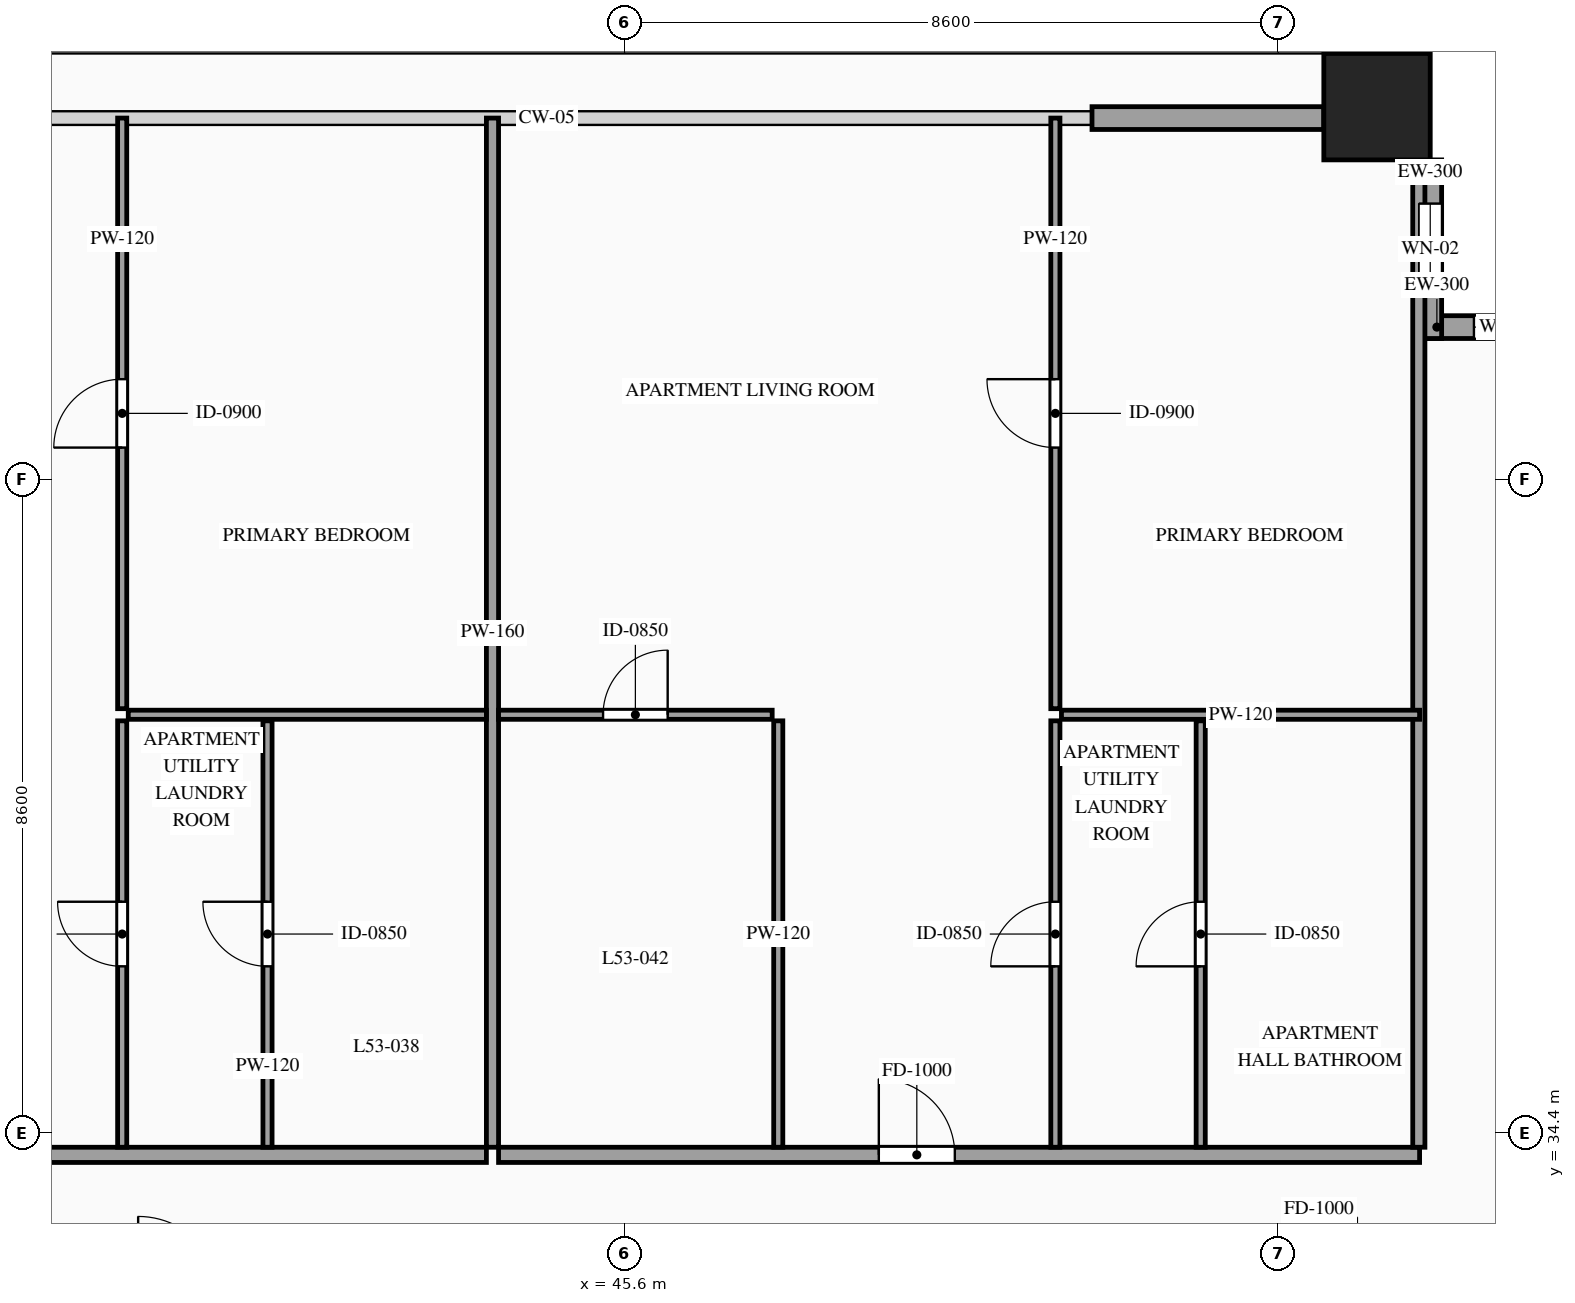
"""IFC4 building model, lengths in metres.
Left out: names, types, materials, properties, quantities, classifications, styles, units other than length and angle.
Written with IfcOpenShell. Run it as: python <this file> out.ifc"""

import sys

from ifc_helpers import new_model, si_unit, direction, frame, frame_2d, origin, origin_2d, place, context, subcontext, project, spatial, rectangle, hollow_rectangle, extrude, source, transform, mapped, element, fill, save


model = new_model("IFC4")
c1 = context("Model", 3, precision=1e-05, world=origin(), true_north=direction((0.0, 1.0)))
c2 = subcontext(c1, "Body", "Model", "MODEL_VIEW")
j1 = project(units=[si_unit("LENGTHUNIT", "METRE"), si_unit("PLANEANGLEUNIT", "RADIAN")], contexts=[c1])
p1 = place(None, origin())
s1 = spatial("IfcSite", under=j1, at=p1, CompositionType="ELEMENT")
p2 = place(p1, origin())
s2 = spatial("IfcBuilding", under=s1, at=p2, CompositionType="ELEMENT")
p3 = place(p2, frame((0.0, 0.0, 202.0)))
s3 = spatial("IfcBuildingStorey", under=s2, at=p3, CompositionType="ELEMENT", Elevation=202.0)
m1 = source(origin(), c2, "Body", "SweptSolid", [
    extrude(hollow_rectangle(XDim=1.4, YDim=1.4, WallThickness=0.06, at=origin_2d()), origin(), (0.0, 0.0, 1.0), 3.5),
])
p4 = place(p3, frame((55.5, 47.9, 0.0), z_axis=(0.0, 0.0, 1.0), x_axis=(1.0, 0.0, 0.0)))
e1 = element("IfcColumn", 1, at=p4, inside=s3, PredefinedType="COLUMN", context=c2, shape_type="MappedRepresentation", body=[
    mapped(m1, transform((0.0, 0.0, 0.0), scale=1.0)),
])
p5 = place(p3, frame((58.4, 45.0, 0.0), z_axis=(0.0, 0.0, 1.0), x_axis=(-1.0, 0.0, 0.0)))
e2 = element("IfcWall", 2, at=p5, inside=s3, PredefinedType="SOLIDWALL", context=c2, shape_type="SweptSolid", body=[
    extrude(rectangle(XDim=2.35, YDim=0.3, at=frame_2d((1.175, 0.0))), origin(), (0.0, 0.0, 1.0), 3.28),
])
p6 = place(p5, frame((0.725, 0.0, 0.85)))
e3 = element("IfcOpeningElement", 3, at=p6, cuts=e2, PredefinedType="OPENING", context=c2, shape_type="SweptSolid", body=[
    extrude(rectangle(XDim=0.9, YDim=1.5, at=frame_2d((0.45, 0.75))), frame((0.0, 0.165, 0.0), z_axis=(0.0, -1.0, 0.0), x_axis=(1.0, 0.0, 0.0)), (0.0, 0.0, 1.0), 0.33),
])
p7 = place(p3, frame((56.2, 44.85, 0.0), z_axis=(0.0, 0.0, 1.0), x_axis=(0.0, 1.0, 0.0)))
e4 = element("IfcWall", 4, at=p7, inside=s3, PredefinedType="SOLIDWALL", context=c2, shape_type="SweptSolid", body=[
    extrude(rectangle(XDim=2.35, YDim=0.3, at=frame_2d((1.175, 0.0))), origin(), (0.0, 0.0, 1.0), 3.28),
])
p8 = place(p7, frame((0.575, 0.0, 0.85)))
e5 = element("IfcOpeningElement", 5, at=p8, cuts=e4, PredefinedType="OPENING", context=c2, shape_type="SweptSolid", body=[
    extrude(rectangle(XDim=1.2, YDim=2.1, at=frame_2d((0.6, 1.05))), frame((0.0, 0.165, 0.0), z_axis=(0.0, -1.0, 0.0), x_axis=(1.0, 0.0, 0.0)), (0.0, 0.0, 1.0), 0.33),
])
m2 = source(origin(), c2, "Body", "SweptSolid", [
    extrude(rectangle(XDim=3.05, YDim=0.3, at=frame_2d((1.525, 0.0))), origin(), (0.0, 0.0, 1.0), 2.835),
])
p9 = place(p3, frame((51.75, 47.75, 0.0), z_axis=(0.0, 0.0, 1.0), x_axis=(1.0, 0.0, 0.0)))
e6 = element("IfcWall", 6, at=p9, inside=s3, PredefinedType="SOLIDWALL", context=c2, shape_type="MappedRepresentation", body=[
    mapped(m2, transform((0.0, 0.0, 0.0), scale=1.0)),
])
p10 = place(p3, frame((30.981, 34.11, 0.0), z_axis=(0.0, 0.0, 1.0), x_axis=(1.0, 0.0, 0.0)))
e7 = element("IfcWall", 7, at=p10, inside=s3, PredefinedType="PARTITIONING", context=c2, shape_type="SweptSolid", body=[
    extrude(rectangle(XDim=12.801, YDim=0.2, at=frame_2d((6.4, 0.0))), origin(), (0.0, 0.0, 1.0), 3.28),
])
p11 = place(p10, frame((5.344, 0.0, 0.0)))
e8 = element("IfcOpeningElement", 8, at=p11, cuts=e7, PredefinedType="OPENING", context=c2, shape_type="SweptSolid", body=[
    extrude(rectangle(XDim=1.0, YDim=2.2, at=frame_2d((0.5, 1.1))), frame((0.0, 0.115, 0.0), z_axis=(0.0, -1.0, 0.0), x_axis=(1.0, 0.0, 0.0)), (0.0, 0.0, 1.0), 0.23),
])
m3 = source(origin(), c2, "Body", "SweptSolid", [
    extrude(rectangle(XDim=13.54, YDim=0.16, at=frame_2d((6.77, 0.0))), origin(), (0.0, 0.0, 1.0), 3.28),
])
p12 = place(p3, frame((43.862, 34.21, 0.0), z_axis=(0.0, 0.0, 1.0), x_axis=(0.0, 1.0, 0.0)))
e9 = element("IfcWall", 9, at=p12, inside=s3, PredefinedType="PARTITIONING", context=c2, shape_type="MappedRepresentation", body=[
    mapped(m3, transform((0.0, 0.0, 0.0), scale=1.0)),
])
p13 = place(p3, frame((40.902, 34.21, 0.0), z_axis=(0.0, 0.0, 1.0), x_axis=(0.0, 1.0, 0.0)))
e10 = element("IfcWall", 10, at=p13, inside=s3, PredefinedType="PARTITIONING", context=c2, shape_type="SweptSolid", body=[
    extrude(rectangle(XDim=5.61, YDim=0.12, at=frame_2d((2.805, 0.0))), origin(), (0.0, 0.0, 1.0), 3.28),
])
p14 = place(p13, frame((2.38, 0.0, 0.0)))
e11 = element("IfcOpeningElement", 11, at=p14, cuts=e10, PredefinedType="OPENING", context=c2, shape_type="SweptSolid", body=[
    extrude(rectangle(XDim=0.85, YDim=2.1, at=frame_2d((0.425, 1.05))), frame((0.0, 0.075, 0.0), z_axis=(0.0, -1.0, 0.0), x_axis=(1.0, 0.0, 0.0)), (0.0, 0.0, 1.0), 0.15),
])
m4 = source(origin(), c2, "Body", "SweptSolid", [
    extrude(rectangle(XDim=4.712, YDim=0.12, at=frame_2d((2.356, 0.0))), origin(), (0.0, 0.0, 1.0), 2.875),
])
p15 = place(p3, frame((39.07, 39.9, 0.0), z_axis=(0.0, 0.0, 1.0), x_axis=(1.0, 0.0, 0.0)))
e12 = element("IfcWall", 12, at=p15, inside=s3, PredefinedType="PARTITIONING", context=c2, shape_type="MappedRepresentation", body=[
    mapped(m4, transform((0.0, 0.0, 0.0), scale=1.0)),
])
p16 = place(p3, frame((38.99, 39.98, 0.0), z_axis=(0.0, 0.0, 1.0), x_axis=(0.0, 1.0, 0.0)))
e13 = element("IfcWall", 13, at=p16, inside=s3, PredefinedType="PARTITIONING", context=c2, shape_type="SweptSolid", body=[
    extrude(rectangle(XDim=7.77, YDim=0.12, at=frame_2d((3.885, 0.0))), origin(), (0.0, 0.0, 1.0), 3.28),
])
p17 = place(p16, frame((3.435, 0.0, 0.0)))
e14 = element("IfcOpeningElement", 14, at=p17, cuts=e13, PredefinedType="OPENING", context=c2, shape_type="SweptSolid", body=[
    extrude(rectangle(XDim=0.9, YDim=2.15, at=frame_2d((0.45, 1.075))), frame((0.0, 0.075, 0.0), z_axis=(0.0, -1.0, 0.0), x_axis=(1.0, 0.0, 0.0)), (0.0, 0.0, 1.0), 0.15),
])
p18 = place(p3, frame((38.99, 34.21, 0.0), z_axis=(0.0, 0.0, 1.0), x_axis=(0.0, 1.0, 0.0)))
e15 = element("IfcWall", 15, at=p18, inside=s3, PredefinedType="PARTITIONING", context=c2, shape_type="SweptSolid", body=[
    extrude(rectangle(XDim=5.61, YDim=0.12, at=frame_2d((2.805, 0.0))), origin(), (0.0, 0.0, 1.0), 3.28),
])
p19 = place(p18, frame((2.38, 0.0, 0.0)))
e16 = element("IfcOpeningElement", 16, at=p19, cuts=e15, PredefinedType="OPENING", context=c2, shape_type="SweptSolid", body=[
    extrude(rectangle(XDim=0.85, YDim=2.1, at=frame_2d((0.425, 1.05))), frame((0.0, 0.075, 0.0), z_axis=(0.0, -1.0, 0.0), x_axis=(1.0, 0.0, 0.0)), (0.0, 0.0, 1.0), 0.15),
])
p20 = place(p3, frame((43.942, 34.11, 0.0), z_axis=(0.0, 0.0, 1.0), x_axis=(1.0, 0.0, 0.0)))
e17 = element("IfcWall", 17, at=p20, inside=s3, PredefinedType="PARTITIONING", context=c2, shape_type="SweptSolid", body=[
    extrude(rectangle(XDim=12.118, YDim=0.2, at=frame_2d((6.059, 0.0))), origin(), (0.0, 0.0, 1.0), 3.28),
])
p21 = place(p20, frame((5.003, 0.0, 0.0)))
e18 = element("IfcOpeningElement", 18, at=p21, cuts=e17, PredefinedType="OPENING", context=c2, shape_type="SweptSolid", body=[
    extrude(rectangle(XDim=1.0, YDim=2.2, at=frame_2d((0.5, 1.1))), frame((0.0, 0.115, 0.0), z_axis=(0.0, -1.0, 0.0), x_axis=(1.0, 0.0, 0.0)), (0.0, 0.0, 1.0), 0.23),
])
m5 = source(origin(), c2, "Body", "SweptSolid", [
    extrude(rectangle(XDim=13.39, YDim=0.16, at=frame_2d((6.695, 0.0))), origin(), (0.0, 0.0, 1.0), 3.28),
])
p22 = place(p3, frame((56.05, 34.21, 0.0), z_axis=(0.0, 0.0, 1.0), x_axis=(0.0, 1.0, 0.0)))
e19 = element("IfcWall", 19, at=p22, inside=s3, PredefinedType="PARTITIONING", context=c2, shape_type="MappedRepresentation", body=[
    mapped(m5, transform((0.0, 0.0, 0.0), scale=1.0)),
])
p23 = place(p3, frame((43.942, 39.9, 0.0), z_axis=(0.0, 0.0, 1.0), x_axis=(1.0, 0.0, 0.0)))
e20 = element("IfcWall", 20, at=p23, inside=s3, PredefinedType="PARTITIONING", context=c2, shape_type="SweptSolid", body=[
    extrude(rectangle(XDim=3.6, YDim=0.12, at=frame_2d((1.8, 0.0))), origin(), (0.0, 0.0, 1.0), 2.875),
])
p24 = place(p23, frame((1.375, 0.0, 0.0)))
e21 = element("IfcOpeningElement", 21, at=p24, cuts=e20, PredefinedType="OPENING", context=c2, shape_type="SweptSolid", body=[
    extrude(rectangle(XDim=0.85, YDim=2.1, at=frame_2d((0.425, 1.05))), frame((0.0, 0.075, 0.0), z_axis=(0.0, -1.0, 0.0), x_axis=(1.0, 0.0, 0.0)), (0.0, 0.0, 1.0), 0.15),
])
m6 = source(origin(), c2, "Body", "SweptSolid", [
    extrude(rectangle(XDim=5.61, YDim=0.12, at=frame_2d((2.805, 0.0))), origin(), (0.0, 0.0, 1.0), 3.28),
])
p25 = place(p3, frame((47.622, 34.21, 0.0), z_axis=(0.0, 0.0, 1.0), x_axis=(0.0, 1.0, 0.0)))
e22 = element("IfcWall", 22, at=p25, inside=s3, PredefinedType="PARTITIONING", context=c2, shape_type="MappedRepresentation", body=[
    mapped(m6, transform((0.0, 0.0, 0.0), scale=1.0)),
])
p26 = place(p3, frame((53.18, 34.21, 0.0), z_axis=(0.0, 0.0, 1.0), x_axis=(0.0, 1.0, 0.0)))
e23 = element("IfcWall", 23, at=p26, inside=s3, PredefinedType="PARTITIONING", context=c2, shape_type="SweptSolid", body=[
    extrude(rectangle(XDim=5.61, YDim=0.12, at=frame_2d((2.805, 0.0))), origin(), (0.0, 0.0, 1.0), 3.28),
])
p27 = place(p26, frame((2.38, 0.0, 0.0)))
e24 = element("IfcOpeningElement", 24, at=p27, cuts=e23, PredefinedType="OPENING", context=c2, shape_type="SweptSolid", body=[
    extrude(rectangle(XDim=0.85, YDim=2.1, at=frame_2d((0.425, 1.05))), frame((0.0, 0.075, 0.0), z_axis=(0.0, -1.0, 0.0), x_axis=(1.0, 0.0, 0.0)), (0.0, 0.0, 1.0), 0.15),
])
m7 = source(origin(), c2, "Body", "SweptSolid", [
    extrude(rectangle(XDim=4.712, YDim=0.12, at=frame_2d((2.356, 0.0))), origin(), (0.0, 0.0, 1.0), 3.28),
])
p28 = place(p3, frame((51.348, 39.9, 0.0), z_axis=(0.0, 0.0, 1.0), x_axis=(1.0, 0.0, 0.0)))
e25 = element("IfcWall", 25, at=p28, inside=s3, PredefinedType="PARTITIONING", context=c2, shape_type="MappedRepresentation", body=[
    mapped(m7, transform((0.0, 0.0, 0.0), scale=1.0)),
])
p29 = place(p3, frame((51.268, 39.98, 0.0), z_axis=(0.0, 0.0, 1.0), x_axis=(0.0, 1.0, 0.0)))
e26 = element("IfcWall", 26, at=p29, inside=s3, PredefinedType="PARTITIONING", context=c2, shape_type="SweptSolid", body=[
    extrude(rectangle(XDim=7.77, YDim=0.12, at=frame_2d((3.885, 0.0))), origin(), (0.0, 0.0, 1.0), 3.28),
])
p30 = place(p29, frame((3.435, 0.0, 0.0)))
e27 = element("IfcOpeningElement", 27, at=p30, cuts=e26, PredefinedType="OPENING", context=c2, shape_type="SweptSolid", body=[
    extrude(rectangle(XDim=0.9, YDim=2.15, at=frame_2d((0.45, 1.075))), frame((0.0, 0.075, 0.0), z_axis=(0.0, -1.0, 0.0), x_axis=(1.0, 0.0, 0.0)), (0.0, 0.0, 1.0), 0.15),
])
p31 = place(p3, frame((51.268, 34.21, 0.0), z_axis=(0.0, 0.0, 1.0), x_axis=(0.0, 1.0, 0.0)))
e28 = element("IfcWall", 28, at=p31, inside=s3, PredefinedType="PARTITIONING", context=c2, shape_type="SweptSolid", body=[
    extrude(rectangle(XDim=5.61, YDim=0.12, at=frame_2d((2.805, 0.0))), origin(), (0.0, 0.0, 1.0), 3.28),
])
p32 = place(p31, frame((2.38, 0.0, 0.0)))
e29 = element("IfcOpeningElement", 29, at=p32, cuts=e28, PredefinedType="OPENING", context=c2, shape_type="SweptSolid", body=[
    extrude(rectangle(XDim=0.85, YDim=2.1, at=frame_2d((0.425, 1.05))), frame((0.0, 0.075, 0.0), z_axis=(0.0, -1.0, 0.0), x_axis=(1.0, 0.0, 0.0)), (0.0, 0.0, 1.0), 0.15),
])
m8 = source(origin(), c2, "Body", "SweptSolid", [
    extrude(rectangle(XDim=0.9, YDim=1.5, at=frame_2d((0.45, 0.75))), frame((0.0, 0.03, 0.0), z_axis=(0.0, -1.0, 0.0), x_axis=(1.0, 0.0, 0.0)), (0.0, 0.0, 1.0), 0.06),
])
p33 = place(p6, origin())
e30 = element("IfcWindow", 30, at=p33, inside=s3, PartitioningType="SINGLE_PANEL", PredefinedType="WINDOW", context=c2, shape_type="MappedRepresentation", body=[
    mapped(m8, transform((0.0, 0.0, 0.0), scale=1.0)),
])
fill(e3, e30)
m9 = source(origin(), c2, "Body", "SweptSolid", [
    extrude(rectangle(XDim=1.2, YDim=2.1, at=frame_2d((0.6, 1.05))), frame((0.0, 0.03, 0.0), z_axis=(0.0, -1.0, 0.0), x_axis=(1.0, 0.0, 0.0)), (0.0, 0.0, 1.0), 0.06),
])
p34 = place(p8, origin())
e31 = element("IfcWindow", 31, at=p34, inside=s3, PartitioningType="SINGLE_PANEL", PredefinedType="WINDOW", context=c2, shape_type="MappedRepresentation", body=[
    mapped(m9, transform((0.0, 0.0, 0.0), scale=1.0)),
])
fill(e5, e31)
m10 = source(origin(), c2, "Body", "SweptSolid", [
    extrude(rectangle(XDim=0.85, YDim=2.1, at=frame_2d((0.425, 1.05))), frame((0.0, 0.025, 0.0), z_axis=(0.0, -1.0, 0.0), x_axis=(1.0, 0.0, 0.0)), (0.0, 0.0, 1.0), 0.05),
])
p35 = place(p14, origin())
e32 = element("IfcDoor", 32, at=p35, inside=s3, OperationType="SINGLE_SWING_RIGHT", PredefinedType="DOOR", context=c2, shape_type="MappedRepresentation", body=[
    mapped(m10, transform((0.0, 0.0, 0.0), scale=1.0)),
])
fill(e11, e32)
m11 = source(origin(), c2, "Body", "SweptSolid", [
    extrude(rectangle(XDim=0.9, YDim=2.15, at=frame_2d((0.45, 1.075))), frame((0.0, 0.025, 0.0), z_axis=(0.0, -1.0, 0.0), x_axis=(1.0, 0.0, 0.0)), (0.0, 0.0, 1.0), 0.05),
])
p36 = place(p17, origin())
e33 = element("IfcDoor", 33, at=p36, inside=s3, OperationType="SINGLE_SWING_LEFT", PredefinedType="DOOR", context=c2, shape_type="MappedRepresentation", body=[
    mapped(m11, transform((0.0, 0.0, 0.0), scale=1.0)),
])
fill(e14, e33)
p37 = place(p19, origin())
e34 = element("IfcDoor", 34, at=p37, inside=s3, OperationType="SINGLE_SWING_RIGHT", PredefinedType="DOOR", context=c2, shape_type="MappedRepresentation", body=[
    mapped(m10, transform((0.0, 0.0, 0.0), scale=1.0)),
])
fill(e16, e34)
m12 = source(origin(), c2, "Body", "SweptSolid", [
    extrude(rectangle(XDim=1.0, YDim=2.2, at=frame_2d((0.5, 1.1))), frame((0.0, 0.025, 0.0), z_axis=(0.0, -1.0, 0.0), x_axis=(1.0, 0.0, 0.0)), (0.0, 0.0, 1.0), 0.05),
])
p38 = place(p21, origin())
e35 = element("IfcDoor", 35, at=p38, inside=s3, OperationType="SINGLE_SWING_LEFT", PredefinedType="DOOR", context=c2, shape_type="MappedRepresentation", body=[
    mapped(m12, transform((0.0, 0.0, 0.0), scale=1.0)),
])
fill(e18, e35)
p39 = place(p24, origin())
e36 = element("IfcDoor", 36, at=p39, inside=s3, OperationType="SINGLE_SWING_RIGHT", PredefinedType="DOOR", context=c2, shape_type="MappedRepresentation", body=[
    mapped(m10, transform((0.0, 0.0, 0.0), scale=1.0)),
])
fill(e21, e36)
p40 = place(p27, origin())
e37 = element("IfcDoor", 37, at=p40, inside=s3, OperationType="SINGLE_SWING_LEFT", PredefinedType="DOOR", context=c2, shape_type="MappedRepresentation", body=[
    mapped(m10, transform((0.0, 0.0, 0.0), scale=1.0)),
])
fill(e24, e37)
p41 = place(p30, origin())
e38 = element("IfcDoor", 38, at=p41, inside=s3, OperationType="SINGLE_SWING_RIGHT", PredefinedType="DOOR", context=c2, shape_type="MappedRepresentation", body=[
    mapped(m11, transform((0.0, 0.0, 0.0), scale=1.0)),
])
fill(e27, e38)
p42 = place(p32, origin())
e39 = element("IfcDoor", 39, at=p42, inside=s3, OperationType="SINGLE_SWING_LEFT", PredefinedType="DOOR", context=c2, shape_type="MappedRepresentation", body=[
    mapped(m10, transform((0.0, 0.0, 0.0), scale=1.0)),
])
fill(e29, e39)
save(model, sys.argv[1])
